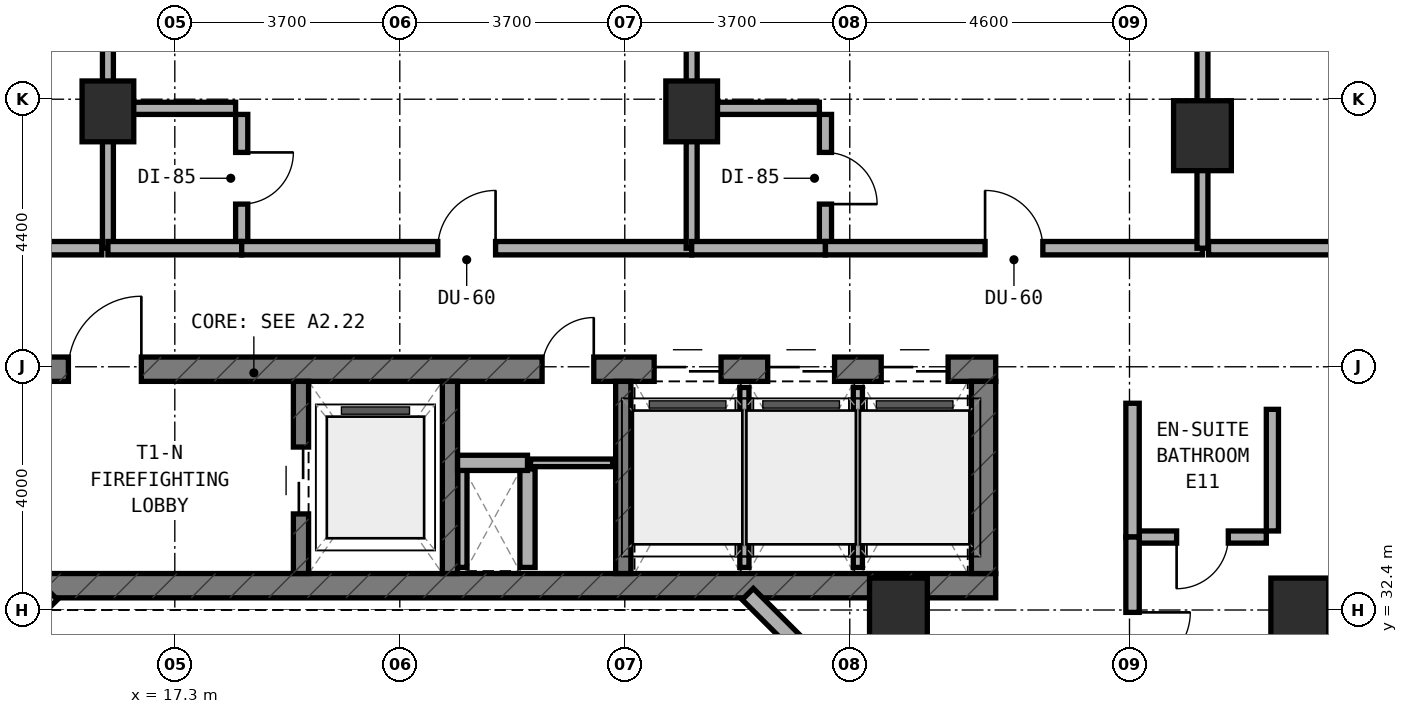
"""IFC4 building model, lengths in metres.
Left out: names, types, materials, properties, quantities, classifications, styles, units other than length and angle.
Written with IfcOpenShell. Run it as: python <this file> out.ifc"""

import sys

from ifc_helpers import new_model, si_unit, direction, frame, frame_2d, origin, origin_2d, place, context, subcontext, project, spatial, rectangle, extrude, element, fill, save


model = new_model("IFC4")
c1 = context("Model", 3, precision=1e-05, world=origin(), true_north=direction((0.0, 1.0)))
c2 = subcontext(c1, "Body", "Model", "MODEL_VIEW")
j1 = project(units=[si_unit("LENGTHUNIT", "METRE"), si_unit("PLANEANGLEUNIT", "RADIAN")], contexts=[c1])
p1 = place(None, origin())
s1 = spatial("IfcSite", under=j1, at=p1, CompositionType="ELEMENT")
p2 = place(p1, origin())
s2 = spatial("IfcBuilding", under=s1, at=p2, CompositionType="ELEMENT")
p3 = place(p2, frame((0.0, 0.0, 95.0)))
s3 = spatial("IfcBuildingStorey", under=s2, at=p3, CompositionType="ELEMENT", Elevation=95.0)
p4 = place(p3, frame((6.4, 32.8, 0.0), z_axis=(0.0, 0.0, 1.0), x_axis=(1.0, 0.0, 0.0)))
e1 = element("IfcWall", 1, at=p4, inside=s3, PredefinedType="SHEAR", context=c2, shape_type="SweptSolid", body=[
    extrude(rectangle(XDim=24.4, YDim=0.4, at=frame_2d((12.2, 0.0))), origin(), (0.0, 0.0, 1.0), 3.5),
])
p5 = place(p4, frame((6.05, 0.0, 0.0)))
e2 = element("IfcOpeningElement", 2, at=p5, cuts=e1, PredefinedType="OPENING", context=c2, shape_type="SweptSolid", body=[
    extrude(rectangle(XDim=1.1, YDim=2.15, at=frame_2d((0.55, 1.075))), frame((0.0, 0.21, 0.0), z_axis=(0.0, -1.0, 0.0), x_axis=(1.0, 0.0, 0.0)), (0.0, 0.0, 1.0), 0.42),
])
p6 = place(p3, frame((6.4, 36.36, 0.0), z_axis=(0.0, 0.0, 1.0), x_axis=(1.0, 0.0, 0.0)))
e3 = element("IfcWall", 3, at=p6, inside=s3, PredefinedType="SHEAR", context=c2, shape_type="SweptSolid", body=[
    extrude(rectangle(XDim=24.4, YDim=0.4, at=frame_2d((12.2, 0.0))), origin(), (0.0, 0.0, 1.0), 3.5),
])
p7 = place(p6, frame((9.15, 0.0, 0.0)))
e4 = element("IfcOpeningElement", 4, at=p7, cuts=e3, PredefinedType="OPENING", context=c2, shape_type="SweptSolid", body=[
    extrude(rectangle(XDim=1.2, YDim=2.15, at=frame_2d((0.6, 1.075))), frame((0.0, 0.21, 0.0), z_axis=(0.0, -1.0, 0.0), x_axis=(1.0, 0.0, 0.0)), (0.0, 0.0, 1.0), 0.42),
])
p8 = place(p6, frame((16.94, 0.0, 0.0)))
e5 = element("IfcOpeningElement", 5, at=p8, cuts=e3, PredefinedType="OPENING", context=c2, shape_type="SweptSolid", body=[
    extrude(rectangle(XDim=0.85, YDim=2.1, at=frame_2d((0.425, 1.05))), frame((0.0, 0.21, 0.0), z_axis=(0.0, -1.0, 0.0), x_axis=(1.0, 0.0, 0.0)), (0.0, 0.0, 1.0), 0.42),
])
p9 = place(p6, frame((18.783, 0.0, 0.0)))
e6 = element("IfcOpeningElement", 6, at=p9, cuts=e3, PredefinedType="OPENING", context=c2, shape_type="SweptSolid", body=[
    extrude(rectangle(XDim=1.1, YDim=2.15, at=frame_2d((0.55, 1.075))), frame((0.0, 0.21, 0.0), z_axis=(0.0, -1.0, 0.0), x_axis=(1.0, 0.0, 0.0)), (0.0, 0.0, 1.0), 0.42),
])
p10 = place(p6, frame((20.65, 0.0, 0.0)))
e7 = element("IfcOpeningElement", 7, at=p10, cuts=e3, PredefinedType="OPENING", context=c2, shape_type="SweptSolid", body=[
    extrude(rectangle(XDim=1.1, YDim=2.15, at=frame_2d((0.55, 1.075))), frame((0.0, 0.21, 0.0), z_axis=(0.0, -1.0, 0.0), x_axis=(1.0, 0.0, 0.0)), (0.0, 0.0, 1.0), 0.42),
])
p11 = place(p6, frame((22.517, 0.0, 0.0)))
e8 = element("IfcOpeningElement", 8, at=p11, cuts=e3, PredefinedType="OPENING", context=c2, shape_type="SweptSolid", body=[
    extrude(rectangle(XDim=1.1, YDim=2.15, at=frame_2d((0.55, 1.075))), frame((0.0, 0.21, 0.0), z_axis=(0.0, -1.0, 0.0), x_axis=(1.0, 0.0, 0.0)), (0.0, 0.0, 1.0), 0.42),
])
p12 = place(p3, frame((30.6, 33.0, 0.0), z_axis=(0.0, 0.0, 1.0), x_axis=(0.0, 1.0, 0.0)))
e9 = element("IfcWall", 9, at=p12, inside=s3, PredefinedType="SHEAR", context=c2, shape_type="SweptSolid", body=[
    extrude(rectangle(XDim=3.16, YDim=0.4, at=frame_2d((1.58, 0.0))), origin(), (0.0, 0.0, 1.0), 3.5),
])
p13 = place(p3, frame((19.375, 33.0, 0.0), z_axis=(0.0, 0.0, 1.0), x_axis=(0.0, 1.0, 0.0)))
e10 = element("IfcWall", 10, at=p13, inside=s3, PredefinedType="STANDARD", context=c2, shape_type="SweptSolid", body=[
    extrude(rectangle(XDim=3.16, YDim=0.25, at=frame_2d((1.58, 0.0))), origin(), (0.0, 0.0, 1.0), 3.22),
])
p14 = place(p13, frame((0.98, 0.0, 0.0)))
e11 = element("IfcOpeningElement", 11, at=p14, cuts=e10, PredefinedType="OPENING", context=c2, shape_type="SweptSolid", body=[
    extrude(rectangle(XDim=1.1, YDim=2.15, at=frame_2d((0.55, 1.075))), frame((0.0, 0.135, 0.0), z_axis=(0.0, -1.0, 0.0), x_axis=(1.0, 0.0, 0.0)), (0.0, 0.0, 1.0), 0.27),
])
for number, where, z_axis, x_axis in (
    (12, (21.825, 33.0, 0.0), (0.0, 0.0, 1.0), (0.0, 1.0, 0.0)),
    (13, (24.675, 33.0, 0.0), (0.0, 0.0, 1.0), (0.0, 1.0, 0.0)),
):
    element("IfcWall", number, at=place(p3, frame(where, z_axis=z_axis, x_axis=x_axis)), inside=s3, PredefinedType="STANDARD", context=c2, shape_type="SweptSolid", body=[
        extrude(rectangle(XDim=3.16, YDim=0.25, at=frame_2d((1.58, 0.0))), origin(), (0.0, 0.0, 1.0), 3.22),
    ])
for number, where, z_axis, x_axis in (
    (14, (16.2, 40.6, 0.0), (0.0, 0.0, 1.0), (1.0, 0.0, 0.0)),
    (15, (25.8, 40.6, 0.0), (0.0, 0.0, 1.0), (1.0, 0.0, 0.0)),
):
    element("IfcColumn", number, at=place(p3, frame(where, z_axis=z_axis, x_axis=x_axis)), inside=s3, PredefinedType="COLUMN", context=c2, shape_type="SweptSolid", body=[
        extrude(rectangle(XDim=0.85, YDim=1.0, at=origin_2d()), origin(), (0.0, 0.0, 1.0), 3.5),
    ])
for number, where, z_axis, x_axis in (
    (16, (34.2, 40.2, 0.0), (0.0, 0.0, 1.0), (1.0, 0.0, 0.0)),
    (17, (35.8, 32.35, 0.0), (0.0, 0.0, 1.0), (1.0, 0.0, 0.0)),
    (18, (29.2, 32.35, 0.0), (0.0, 0.0, 1.0), (1.0, 0.0, 0.0)),
):
    element("IfcColumn", number, at=place(p3, frame(where, z_axis=z_axis, x_axis=x_axis)), inside=s3, PredefinedType="COLUMN", context=c2, shape_type="SweptSolid", body=[
        extrude(rectangle(XDim=0.95, YDim=1.15, at=origin_2d()), origin(), (0.0, 0.0, 1.0), 3.5),
    ])
for number, where, z_axis, x_axis in (
    (19, (28.556, 30.828, 0.0), (0.0, 0.0, 1.0), (-0.707, 0.707, 0.0)),
    (20, (15.278, 32.662, 0.0), (0.0, 0.0, 1.0), (-0.707, -0.707, 0.0)),
):
    element("IfcWall", number, at=place(p3, frame(where, z_axis=z_axis, x_axis=x_axis)), inside=s3, PredefinedType="STANDARD", context=c2, shape_type="SweptSolid", body=[
        extrude(rectangle(XDim=2.594, YDim=0.26, at=frame_2d((1.297, 0.0))), origin(), (0.0, 0.0, 1.0), 3.22),
    ])
p15 = place(p3, frame((22.03, 33.1, 0.0), z_axis=(0.0, 0.0, 1.0), x_axis=(0.0, 1.0, 0.0)))
e21 = element("IfcWall", 21, at=p15, inside=s3, PredefinedType="PARTITIONING", context=c2, shape_type="SweptSolid", body=[
    extrude(rectangle(XDim=1.62, YDim=0.15, at=frame_2d((0.81, 0.0))), origin(), (0.0, 0.0, 1.0), 3.22),
])
p16 = place(p3, frame((23.1, 33.1, 0.0), z_axis=(0.0, 0.0, 1.0), x_axis=(0.0, 1.0, 0.0)))
e22 = element("IfcWall", 22, at=p16, inside=s3, PredefinedType="SOLIDWALL", context=c2, shape_type="SweptSolid", body=[
    extrude(rectangle(XDim=1.62, YDim=0.25, at=frame_2d((0.81, 0.0))), origin(), (0.0, 0.0, 1.0), 3.22),
])
p17 = place(p3, frame((21.95, 34.82, 0.0), z_axis=(0.0, 0.0, 1.0), x_axis=(1.0, 0.0, 0.0)))
e23 = element("IfcWall", 23, at=p17, inside=s3, PredefinedType="SOLIDWALL", context=c2, shape_type="SweptSolid", body=[
    extrude(rectangle(XDim=1.15, YDim=0.25, at=frame_2d((0.575, 0.0))), origin(), (0.0, 0.0, 1.0), 3.22),
])
p18 = place(p3, frame((23.15, 34.82, 0.0), z_axis=(0.0, 0.0, 1.0), x_axis=(1.0, 0.0, 0.0)))
e24 = element("IfcWall", 24, at=p18, inside=s3, PredefinedType="PARTITIONING", context=c2, shape_type="SweptSolid", body=[
    extrude(rectangle(XDim=1.35, YDim=0.125, at=frame_2d((0.675, 0.0))), origin(), (0.0, 0.0, 1.0), 3.22),
])
p19 = place(p3, frame((26.667, 33.1, 0.0), z_axis=(0.0, 0.0, 1.0), x_axis=(0.0, 1.0, 0.0)))
e25 = element("IfcWall", 25, at=p19, inside=s3, PredefinedType="PARTITIONING", context=c2, shape_type="SweptSolid", body=[
    extrude(rectangle(XDim=2.96, YDim=0.15, at=frame_2d((1.48, 0.0))), origin(), (0.0, 0.0, 1.0), 3.22),
])
p20 = place(p3, frame((28.533, 33.1, 0.0), z_axis=(0.0, 0.0, 1.0), x_axis=(0.0, 1.0, 0.0)))
e26 = element("IfcWall", 26, at=p20, inside=s3, PredefinedType="PARTITIONING", context=c2, shape_type="SweptSolid", body=[
    extrude(rectangle(XDim=2.96, YDim=0.15, at=frame_2d((1.48, 0.0))), origin(), (0.0, 0.0, 1.0), 2.595),
])
p21 = place(p3, frame((7.9, 38.35, 0.0), z_axis=(0.0, 0.0, 1.0), x_axis=(1.0, 0.0, 0.0)))
e27 = element("IfcWall", 27, at=p21, inside=s3, PredefinedType="SOLIDWALL", context=c2, shape_type="SweptSolid", body=[
    extrude(rectangle(XDim=8.2, YDim=0.22, at=frame_2d((4.1, 0.0))), origin(), (0.0, 0.0, 1.0), 3.22),
])
p22 = place(p21, frame((3.252, 0.0, 0.0)))
e28 = element("IfcOpeningElement", 28, at=p22, cuts=e27, PredefinedType="OPENING", context=c2, shape_type="SweptSolid", body=[
    extrude(rectangle(XDim=0.95, YDim=2.1, at=frame_2d((0.475, 1.05))), frame((0.0, 0.12, 0.0), z_axis=(0.0, -1.0, 0.0), x_axis=(1.0, 0.0, 0.0)), (0.0, 0.0, 1.0), 0.24),
])
p23 = place(p3, frame((16.2, 38.35, 0.0), z_axis=(0.0, 0.0, 1.0), x_axis=(0.0, 1.0, 0.0)))
e29 = element("IfcWall", 29, at=p23, inside=s3, PredefinedType="SOLIDWALL", context=c2, shape_type="SweptSolid", body=[
    extrude(rectangle(XDim=6.79, YDim=0.18, at=frame_2d((3.395, 0.0))), origin(), (0.0, 0.0, 1.0), 2.595),
])
p24 = place(p3, frame((18.4, 38.45, 0.0), z_axis=(0.0, 0.0, 1.0), x_axis=(0.0, 1.0, 0.0)))
e30 = element("IfcWall", 30, at=p24, inside=s3, PredefinedType="PLUMBINGWALL", context=c2, shape_type="SweptSolid", body=[
    extrude(rectangle(XDim=2.1, YDim=0.2, at=frame_2d((1.05, 0.0))), origin(), (0.0, 0.0, 1.0), 2.835),
])
p25 = place(p24, frame((0.625, 0.0, 0.0)))
e31 = element("IfcOpeningElement", 31, at=p25, cuts=e30, PredefinedType="OPENING", context=c2, shape_type="SweptSolid", body=[
    extrude(rectangle(XDim=0.85, YDim=2.1, at=frame_2d((0.425, 1.05))), frame((0.0, 0.11, 0.0), z_axis=(0.0, -1.0, 0.0), x_axis=(1.0, 0.0, 0.0)), (0.0, 0.0, 1.0), 0.22),
])
p26 = place(p3, frame((16.3, 40.65, 0.0), z_axis=(0.0, 0.0, 1.0), x_axis=(1.0, 0.0, 0.0)))
e32 = element("IfcWall", 32, at=p26, inside=s3, PredefinedType="PLUMBINGWALL", context=c2, shape_type="SweptSolid", body=[
    extrude(rectangle(XDim=2.0, YDim=0.2, at=frame_2d((1.0, 0.0))), origin(), (0.0, 0.0, 1.0), 2.835),
])
p27 = place(p3, frame((16.2, 38.35, 0.0), z_axis=(0.0, 0.0, 1.0), x_axis=(1.0, 0.0, 0.0)))
e33 = element("IfcWall", 33, at=p27, inside=s3, PredefinedType="SOLIDWALL", context=c2, shape_type="SweptSolid", body=[
    extrude(rectangle(XDim=2.2, YDim=0.22, at=frame_2d((1.1, 0.0))), origin(), (0.0, 0.0, 1.0), 2.595),
])
p28 = place(p3, frame((18.4, 38.35, 0.0), z_axis=(0.0, 0.0, 1.0), x_axis=(1.0, 0.0, 0.0)))
e34 = element("IfcWall", 34, at=p28, inside=s3, PredefinedType="SOLIDWALL", context=c2, shape_type="SweptSolid", body=[
    extrude(rectangle(XDim=7.4, YDim=0.22, at=frame_2d((3.7, 0.0))), origin(), (0.0, 0.0, 1.0), 2.595),
])
p29 = place(p28, frame((3.225, 0.0, 0.0)))
e35 = element("IfcOpeningElement", 35, at=p29, cuts=e34, PredefinedType="OPENING", context=c2, shape_type="SweptSolid", body=[
    extrude(rectangle(XDim=0.95, YDim=2.1, at=frame_2d((0.475, 1.05))), frame((0.0, 0.12, 0.0), z_axis=(0.0, -1.0, 0.0), x_axis=(1.0, 0.0, 0.0)), (0.0, 0.0, 1.0), 0.24),
])
p30 = place(p3, frame((25.8, 38.35, 0.0), z_axis=(0.0, 0.0, 1.0), x_axis=(0.0, 1.0, 0.0)))
e36 = element("IfcWall", 36, at=p30, inside=s3, PredefinedType="SOLIDWALL", context=c2, shape_type="SweptSolid", body=[
    extrude(rectangle(XDim=6.79, YDim=0.18, at=frame_2d((3.395, 0.0))), origin(), (0.0, 0.0, 1.0), 2.595),
])
p31 = place(p3, frame((28.0, 38.45, 0.0), z_axis=(0.0, 0.0, 1.0), x_axis=(0.0, 1.0, 0.0)))
e37 = element("IfcWall", 37, at=p31, inside=s3, PredefinedType="PLUMBINGWALL", context=c2, shape_type="SweptSolid", body=[
    extrude(rectangle(XDim=2.1, YDim=0.2, at=frame_2d((1.05, 0.0))), origin(), (0.0, 0.0, 1.0), 2.835),
])
p32 = place(p31, frame((0.625, 0.0, 0.0)))
e38 = element("IfcOpeningElement", 38, at=p32, cuts=e37, PredefinedType="OPENING", context=c2, shape_type="SweptSolid", body=[
    extrude(rectangle(XDim=0.85, YDim=2.1, at=frame_2d((0.425, 1.05))), frame((0.0, 0.11, 0.0), z_axis=(0.0, -1.0, 0.0), x_axis=(1.0, 0.0, 0.0)), (0.0, 0.0, 1.0), 0.22),
])
p33 = place(p3, frame((25.9, 40.65, 0.0), z_axis=(0.0, 0.0, 1.0), x_axis=(1.0, 0.0, 0.0)))
e39 = element("IfcWall", 39, at=p33, inside=s3, PredefinedType="PLUMBINGWALL", context=c2, shape_type="SweptSolid", body=[
    extrude(rectangle(XDim=2.0, YDim=0.2, at=frame_2d((1.0, 0.0))), origin(), (0.0, 0.0, 1.0), 2.835),
])
p34 = place(p3, frame((25.8, 38.35, 0.0), z_axis=(0.0, 0.0, 1.0), x_axis=(1.0, 0.0, 0.0)))
e40 = element("IfcWall", 40, at=p34, inside=s3, PredefinedType="SOLIDWALL", context=c2, shape_type="SweptSolid", body=[
    extrude(rectangle(XDim=2.2, YDim=0.22, at=frame_2d((1.1, 0.0))), origin(), (0.0, 0.0, 1.0), 2.595),
])
p35 = place(p3, frame((28.0, 38.35, 0.0), z_axis=(0.0, 0.0, 1.0), x_axis=(1.0, 0.0, 0.0)))
e41 = element("IfcWall", 41, at=p35, inside=s3, PredefinedType="SOLIDWALL", context=c2, shape_type="SweptSolid", body=[
    extrude(rectangle(XDim=6.2, YDim=0.22, at=frame_2d((3.1, 0.0))), origin(), (0.0, 0.0, 1.0), 2.595),
])
p36 = place(p35, frame((2.625, 0.0, 0.0)))
e42 = element("IfcOpeningElement", 42, at=p36, cuts=e41, PredefinedType="OPENING", context=c2, shape_type="SweptSolid", body=[
    extrude(rectangle(XDim=0.95, YDim=2.1, at=frame_2d((0.475, 1.05))), frame((0.0, 0.12, 0.0), z_axis=(0.0, -1.0, 0.0), x_axis=(1.0, 0.0, 0.0)), (0.0, 0.0, 1.0), 0.24),
])
p37 = place(p3, frame((34.2, 38.35, 0.0), z_axis=(0.0, 0.0, 1.0), x_axis=(0.0, 1.0, 0.0)))
e43 = element("IfcWall", 43, at=p37, inside=s3, PredefinedType="SOLIDWALL", context=c2, shape_type="SweptSolid", body=[
    extrude(rectangle(XDim=5.351, YDim=0.18, at=frame_2d((2.675, 0.0))), origin(), (0.0, 0.0, 1.0), 2.595),
])
p38 = place(p3, frame((34.3, 38.35, 0.0), z_axis=(0.0, 0.0, 1.0), x_axis=(1.0, 0.0, 0.0)))
e44 = element("IfcWall", 44, at=p38, inside=s3, PredefinedType="SOLIDWALL", context=c2, shape_type="SweptSolid", body=[
    extrude(rectangle(XDim=6.64, YDim=0.22, at=frame_2d((3.32, 0.0))), origin(), (0.0, 0.0, 1.0), 2.835),
])
p39 = place(p38, frame((2.55, 0.0, 0.0)))
e45 = element("IfcOpeningElement", 45, at=p39, cuts=e44, PredefinedType="OPENING", context=c2, shape_type="SweptSolid", body=[
    extrude(rectangle(XDim=0.95, YDim=2.1, at=frame_2d((0.475, 1.05))), frame((0.0, 0.12, 0.0), z_axis=(0.0, -1.0, 0.0), x_axis=(1.0, 0.0, 0.0)), (0.0, 0.0, 1.0), 0.24),
])
p40 = place(p3, frame((33.15, 33.6, 0.0), z_axis=(0.0, 0.0, 1.0), x_axis=(1.0, 0.0, 0.0)))
e46 = element("IfcWall", 46, at=p40, inside=s3, PredefinedType="PLUMBINGWALL", context=c2, shape_type="SweptSolid", body=[
    extrude(rectangle(XDim=2.1, YDim=0.2, at=frame_2d((1.05, 0.0))), origin(), (0.0, 0.0, 1.0), 3.22),
])
p41 = place(p40, frame((0.625, 0.0, 0.0)))
e47 = element("IfcOpeningElement", 47, at=p41, cuts=e46, PredefinedType="OPENING", context=c2, shape_type="SweptSolid", body=[
    extrude(rectangle(XDim=0.85, YDim=2.1, at=frame_2d((0.425, 1.05))), frame((0.0, 0.11, 0.0), z_axis=(0.0, -1.0, 0.0), x_axis=(1.0, 0.0, 0.0)), (0.0, 0.0, 1.0), 0.22),
])
p42 = place(p3, frame((35.35, 33.7, 0.0), z_axis=(0.0, 0.0, 1.0), x_axis=(0.0, 1.0, 0.0)))
e48 = element("IfcWall", 48, at=p42, inside=s3, PredefinedType="PLUMBINGWALL", context=c2, shape_type="SweptSolid", body=[
    extrude(rectangle(XDim=2.0, YDim=0.2, at=frame_2d((1.0, 0.0))), origin(), (0.0, 0.0, 1.0), 2.835),
])
p43 = place(p3, frame((33.05, 33.6, 0.0), z_axis=(0.0, 0.0, 1.0), x_axis=(0.0, 1.0, 0.0)))
e49 = element("IfcWall", 49, at=p43, inside=s3, PredefinedType="SOLIDWALL", context=c2, shape_type="SweptSolid", body=[
    extrude(rectangle(XDim=2.2, YDim=0.22, at=frame_2d((1.1, 0.0))), origin(), (0.0, 0.0, 1.0), 3.22),
])
p44 = place(p3, frame((33.05, 30.172, 0.0), z_axis=(0.0, 0.0, 1.0), x_axis=(0.0, 1.0, 0.0)))
e50 = element("IfcWall", 50, at=p44, inside=s3, PredefinedType="SOLIDWALL", context=c2, shape_type="SweptSolid", body=[
    extrude(rectangle(XDim=3.428, YDim=0.22, at=frame_2d((1.714, 0.0))), origin(), (0.0, 0.0, 1.0), 2.595),
])
p45 = place(p44, frame((1.239, 0.0, 0.0)))
e51 = element("IfcOpeningElement", 51, at=p45, cuts=e50, PredefinedType="OPENING", context=c2, shape_type="SweptSolid", body=[
    extrude(rectangle(XDim=0.95, YDim=2.1, at=frame_2d((0.475, 1.05))), frame((0.0, 0.12, 0.0), z_axis=(0.0, -1.0, 0.0), x_axis=(1.0, 0.0, 0.0)), (0.0, 0.0, 1.0), 0.24),
])
p46 = place(p7, origin())
e52 = element("IfcDoor", 52, at=p46, inside=s3, OperationType="SINGLE_SWING_RIGHT", PredefinedType="DOOR", context=c2, shape_type="SweptSolid", body=[
    extrude(rectangle(XDim=1.2, YDim=2.15, at=frame_2d((0.6, 1.075))), frame((0.0, 0.025, 0.0), z_axis=(0.0, -1.0, 0.0), x_axis=(1.0, 0.0, 0.0)), (0.0, 0.0, 1.0), 0.05),
])
fill(e4, e52)
p47 = place(p14, origin())
e53 = element("IfcDoor", 53, at=p47, inside=s3, OperationType="DOUBLE_DOOR_SLIDING", PredefinedType="DOOR", context=c2, shape_type="SweptSolid", body=[
    extrude(rectangle(XDim=1.1, YDim=2.15, at=frame_2d((0.55, 1.075))), frame((0.0, 0.025, 0.0), z_axis=(0.0, -1.0, 0.0), x_axis=(1.0, 0.0, 0.0)), (0.0, 0.0, 1.0), 0.05),
])
fill(e11, e53)
p48 = place(p8, origin())
e54 = element("IfcDoor", 54, at=p48, inside=s3, OperationType="SINGLE_SWING_RIGHT", PredefinedType="DOOR", context=c2, shape_type="SweptSolid", body=[
    extrude(rectangle(XDim=0.85, YDim=2.1, at=frame_2d((0.425, 1.05))), frame((0.0, 0.025, 0.0), z_axis=(0.0, -1.0, 0.0), x_axis=(1.0, 0.0, 0.0)), (0.0, 0.0, 1.0), 0.05),
])
fill(e5, e54)
p49 = place(p9, origin())
e55 = element("IfcDoor", 55, at=p49, inside=s3, OperationType="DOUBLE_DOOR_SLIDING", PredefinedType="DOOR", context=c2, shape_type="SweptSolid", body=[
    extrude(rectangle(XDim=1.1, YDim=2.15, at=frame_2d((0.55, 1.075))), frame((0.0, 0.025, 0.0), z_axis=(0.0, -1.0, 0.0), x_axis=(1.0, 0.0, 0.0)), (0.0, 0.0, 1.0), 0.05),
])
fill(e6, e55)
p50 = place(p10, origin())
e56 = element("IfcDoor", 56, at=p50, inside=s3, OperationType="DOUBLE_DOOR_SLIDING", PredefinedType="DOOR", context=c2, shape_type="SweptSolid", body=[
    extrude(rectangle(XDim=1.1, YDim=2.15, at=frame_2d((0.55, 1.075))), frame((0.0, 0.025, 0.0), z_axis=(0.0, -1.0, 0.0), x_axis=(1.0, 0.0, 0.0)), (0.0, 0.0, 1.0), 0.05),
])
fill(e7, e56)
p51 = place(p11, origin())
e57 = element("IfcDoor", 57, at=p51, inside=s3, OperationType="DOUBLE_DOOR_SLIDING", PredefinedType="DOOR", context=c2, shape_type="SweptSolid", body=[
    extrude(rectangle(XDim=1.1, YDim=2.15, at=frame_2d((0.55, 1.075))), frame((0.0, 0.025, 0.0), z_axis=(0.0, -1.0, 0.0), x_axis=(1.0, 0.0, 0.0)), (0.0, 0.0, 1.0), 0.05),
])
fill(e8, e57)
p52 = place(p25, frame((0.85, 0.0, 0.0), z_axis=(0.0, 0.0, 1.0), x_axis=(-1.0, 0.0, 0.0)))
e58 = element("IfcDoor", 58, at=p52, inside=s3, OperationType="SINGLE_SWING_LEFT", PredefinedType="DOOR", context=c2, shape_type="SweptSolid", body=[
    extrude(rectangle(XDim=0.85, YDim=2.1, at=frame_2d((0.425, 1.05))), frame((0.0, 0.025, 0.0), z_axis=(0.0, -1.0, 0.0), x_axis=(1.0, 0.0, 0.0)), (0.0, 0.0, 1.0), 0.05),
])
fill(e31, e58)
p53 = place(p29, origin())
e59 = element("IfcDoor", 59, at=p53, inside=s3, OperationType="SINGLE_SWING_RIGHT", PredefinedType="DOOR", context=c2, shape_type="SweptSolid", body=[
    extrude(rectangle(XDim=0.95, YDim=2.1, at=frame_2d((0.475, 1.05))), frame((0.0, 0.025, 0.0), z_axis=(0.0, -1.0, 0.0), x_axis=(1.0, 0.0, 0.0)), (0.0, 0.0, 1.0), 0.05),
])
fill(e35, e59)
p54 = place(p32, frame((0.85, 0.0, 0.0), z_axis=(0.0, 0.0, 1.0), x_axis=(-1.0, 0.0, 0.0)))
e60 = element("IfcDoor", 60, at=p54, inside=s3, OperationType="SINGLE_SWING_RIGHT", PredefinedType="DOOR", context=c2, shape_type="SweptSolid", body=[
    extrude(rectangle(XDim=0.85, YDim=2.1, at=frame_2d((0.425, 1.05))), frame((0.0, 0.025, 0.0), z_axis=(0.0, -1.0, 0.0), x_axis=(1.0, 0.0, 0.0)), (0.0, 0.0, 1.0), 0.05),
])
fill(e38, e60)
p55 = place(p36, origin())
e61 = element("IfcDoor", 61, at=p55, inside=s3, OperationType="SINGLE_SWING_LEFT", PredefinedType="DOOR", context=c2, shape_type="SweptSolid", body=[
    extrude(rectangle(XDim=0.95, YDim=2.1, at=frame_2d((0.475, 1.05))), frame((0.0, 0.025, 0.0), z_axis=(0.0, -1.0, 0.0), x_axis=(1.0, 0.0, 0.0)), (0.0, 0.0, 1.0), 0.05),
])
fill(e42, e61)
p56 = place(p41, frame((0.85, 0.0, 0.0), z_axis=(0.0, 0.0, 1.0), x_axis=(-1.0, 0.0, 0.0)))
e62 = element("IfcDoor", 62, at=p56, inside=s3, OperationType="SINGLE_SWING_RIGHT", PredefinedType="DOOR", context=c2, shape_type="SweptSolid", body=[
    extrude(rectangle(XDim=0.85, YDim=2.1, at=frame_2d((0.425, 1.05))), frame((0.0, 0.025, 0.0), z_axis=(0.0, -1.0, 0.0), x_axis=(1.0, 0.0, 0.0)), (0.0, 0.0, 1.0), 0.05),
])
fill(e47, e62)
p57 = place(p45, frame((0.95, 0.0, 0.0), z_axis=(0.0, 0.0, 1.0), x_axis=(-1.0, 0.0, 0.0)))
e63 = element("IfcDoor", 63, at=p57, inside=s3, OperationType="SINGLE_SWING_LEFT", PredefinedType="DOOR", context=c2, shape_type="SweptSolid", body=[
    extrude(rectangle(XDim=0.95, YDim=2.1, at=frame_2d((0.475, 1.05))), frame((0.0, 0.025, 0.0), z_axis=(0.0, -1.0, 0.0), x_axis=(1.0, 0.0, 0.0)), (0.0, 0.0, 1.0), 0.05),
])
fill(e51, e63)
save(model, sys.argv[1])
